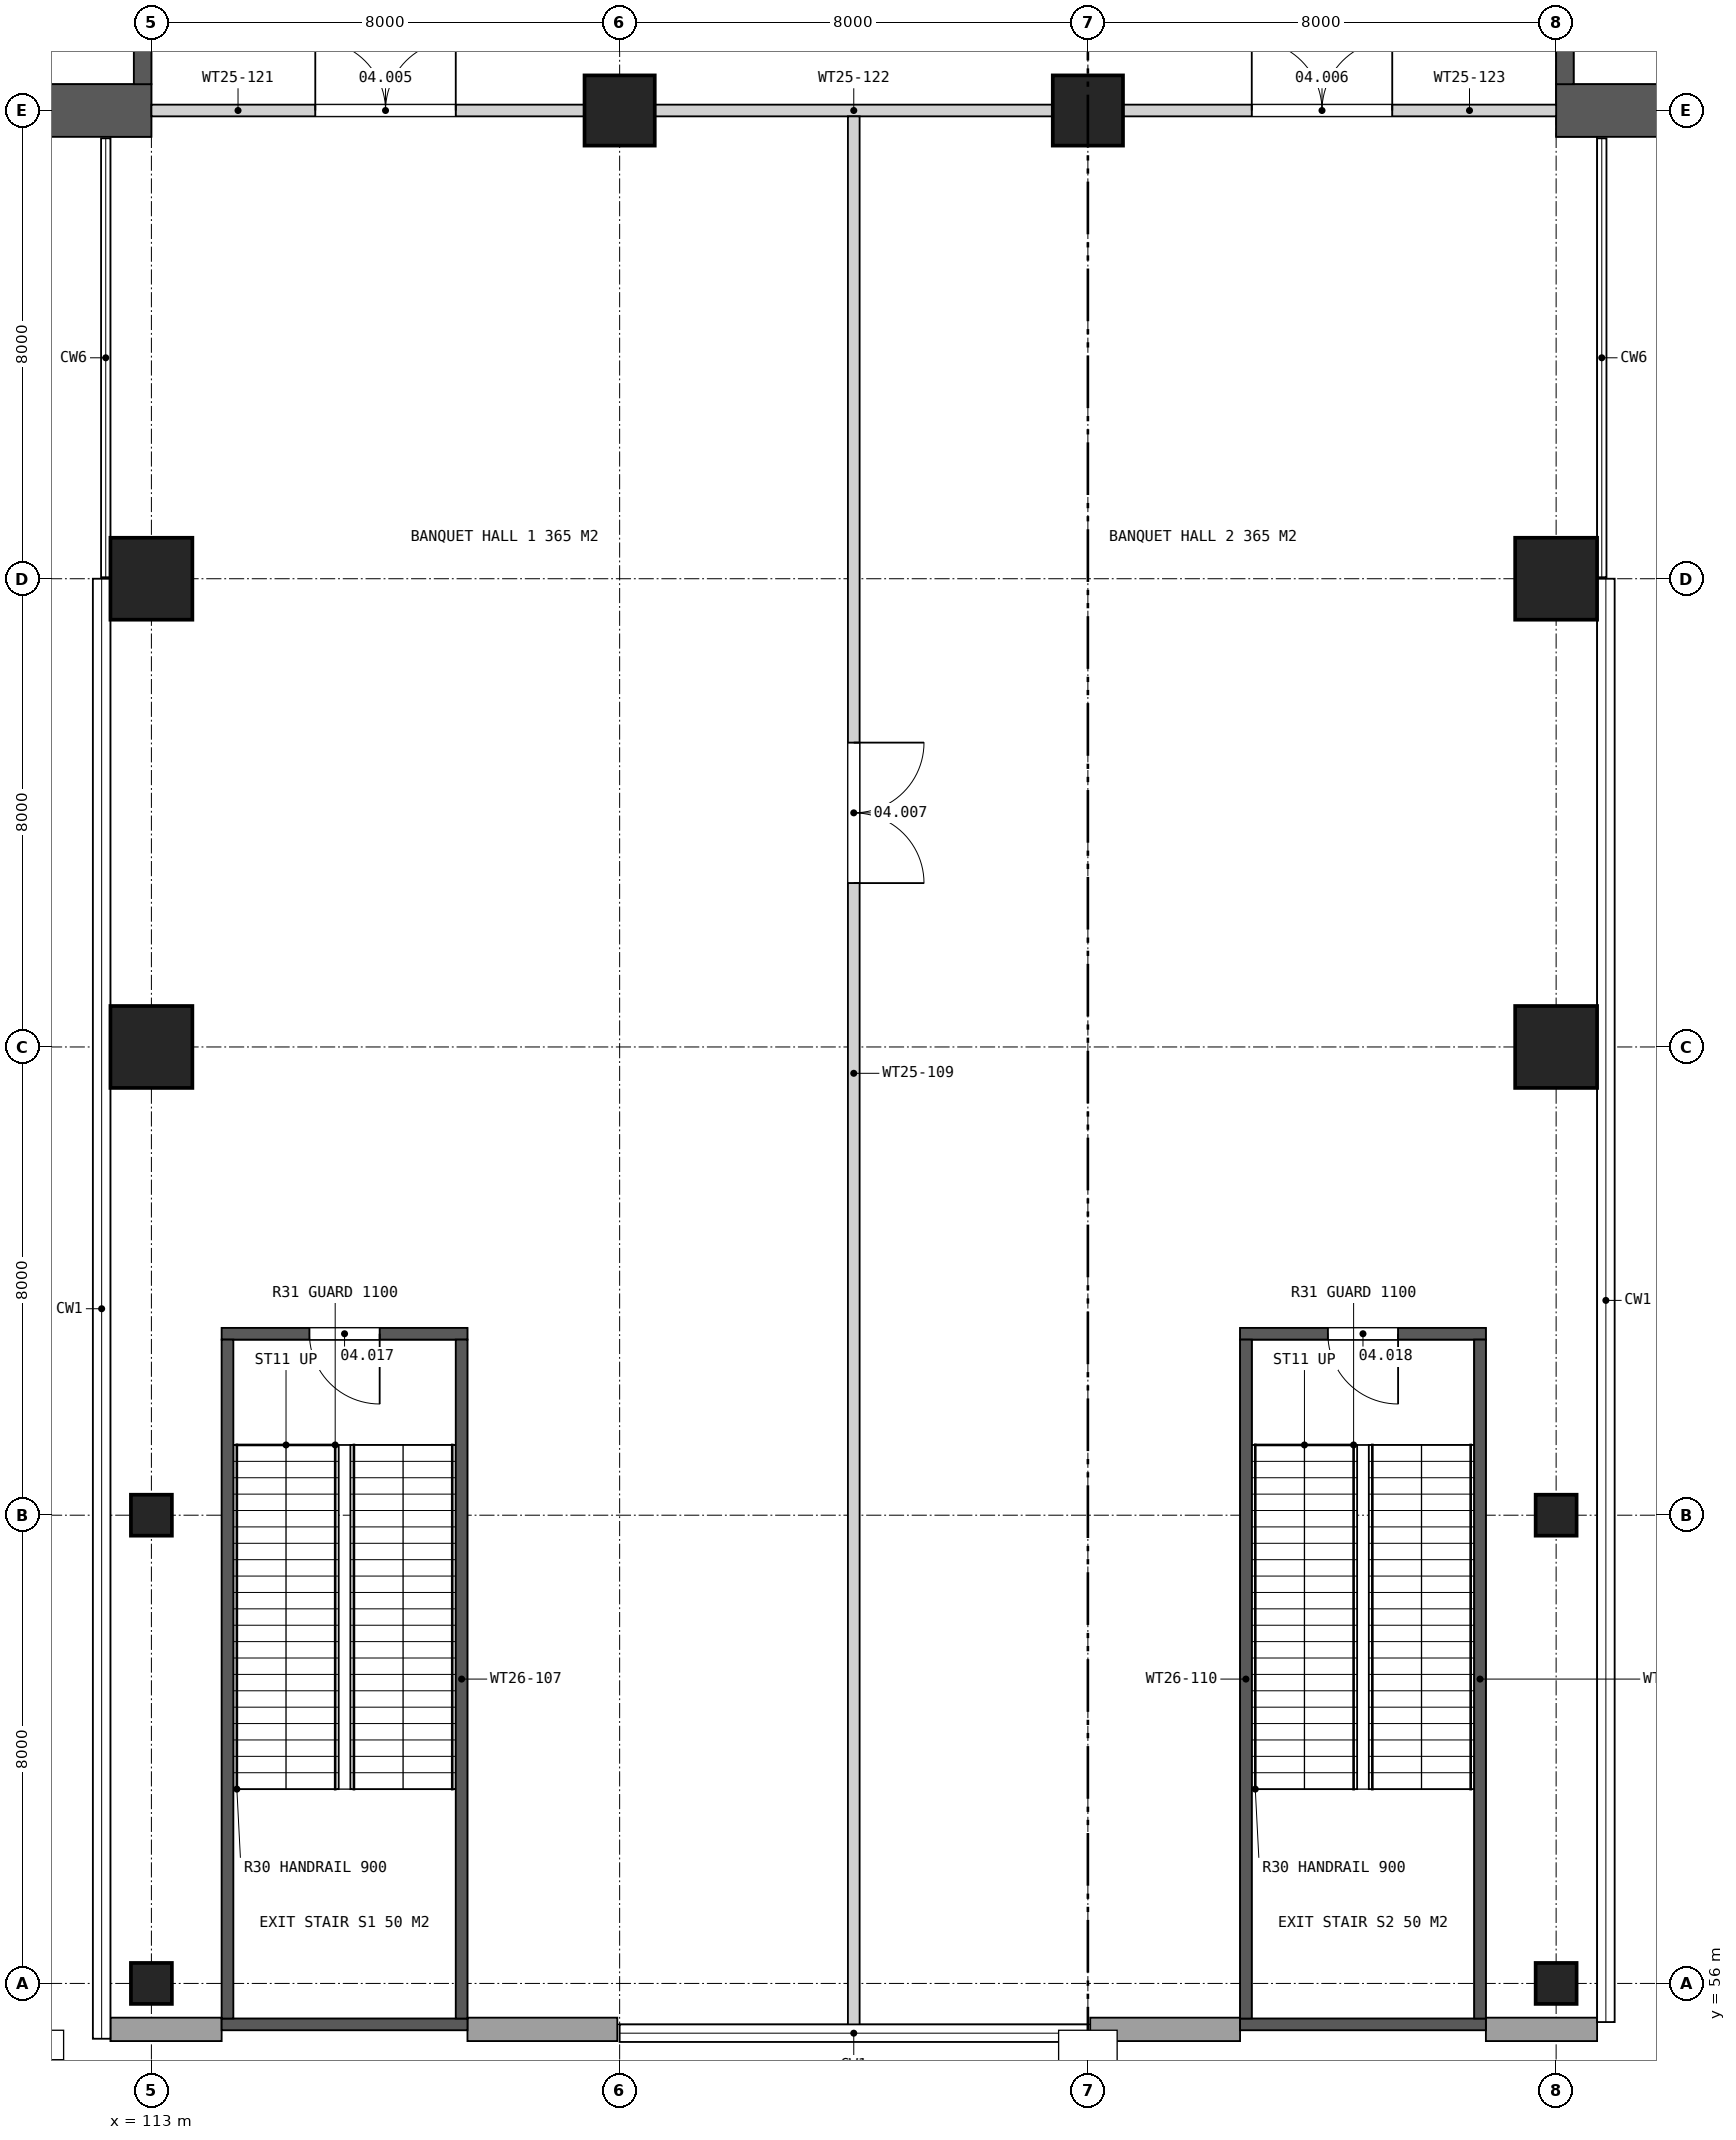
"""IFC4 building model, lengths in metres.
Left out: names, types, materials, properties, quantities, classifications, styles, units other than length and angle.
Written with IfcOpenShell. Run it as: python <this file> out.ifc"""

import sys

from ifc_helpers import new_model, si_unit, direction, frame, frame_2d, origin, origin_2d, place, context, subcontext, project, spatial, rectangle, extrude, element, fill, save


model = new_model("IFC4")
c1 = context("Model", 3, precision=1e-05, world=origin(), true_north=direction((0.0, 1.0)))
c2 = subcontext(c1, "Body", "Model", "MODEL_VIEW")
j1 = project(units=[si_unit("LENGTHUNIT", "METRE"), si_unit("PLANEANGLEUNIT", "RADIAN")], contexts=[c1])
p1 = place(None, origin())
s1 = spatial("IfcSite", under=j1, at=p1, CompositionType="ELEMENT")
p2 = place(p1, origin())
s2 = spatial("IfcBuilding", under=s1, at=p2, CompositionType="ELEMENT")
p3 = place(p2, frame((0.0, 0.0, 34.0)))
s3 = spatial("IfcBuildingStorey", under=s2, at=p3, CompositionType="ELEMENT", Elevation=34.0)
for number, where, z_axis, x_axis in (
    (1, (113.0, 56.0, 0.0), (0.0, 0.0, 1.0), (1.0, 0.0, 0.0)),
    (2, (113.0, 64.0, 0.0), (0.0, 0.0, 1.0), (1.0, 0.0, 0.0)),
):
    element("IfcColumn", number, at=place(p3, frame(where, z_axis=z_axis, x_axis=x_axis)), inside=s3, PredefinedType="COLUMN", context=c2, shape_type="SweptSolid", body=[
        extrude(rectangle(XDim=0.7, YDim=0.7, at=origin_2d()), origin(), (0.0, 0.0, 1.0), 7.5),
    ])
for number, where, z_axis, x_axis in (
    (3, (113.0, 72.0, 0.0), (0.0, 0.0, 1.0), (1.0, 0.0, 0.0)),
    (4, (113.0, 80.0, 0.0), (0.0, 0.0, 1.0), (1.0, 0.0, 0.0)),
):
    element("IfcColumn", number, at=place(p3, frame(where, z_axis=z_axis, x_axis=x_axis)), inside=s3, PredefinedType="COLUMN", context=c2, shape_type="SweptSolid", body=[
        extrude(rectangle(XDim=1.4, YDim=1.4, at=origin_2d()), origin(), (0.0, 0.0, 1.0), 7.5),
    ])
for number, where, z_axis, x_axis in (
    (5, (121.0, 88.0, 0.0), (0.0, 0.0, 1.0), (1.0, 0.0, 0.0)),
    (6, (129.0, 88.0, 0.0), (0.0, 0.0, 1.0), (1.0, 0.0, 0.0)),
):
    element("IfcColumn", number, at=place(p3, frame(where, z_axis=z_axis, x_axis=x_axis)), inside=s3, PredefinedType="COLUMN", context=c2, shape_type="SweptSolid", body=[
        extrude(rectangle(XDim=1.2, YDim=1.2, at=origin_2d()), origin(), (0.0, 0.0, 1.0), 7.5),
    ])
for number, where, z_axis, x_axis in (
    (7, (137.0, 56.0, 0.0), (0.0, 0.0, 1.0), (1.0, 0.0, 0.0)),
    (8, (137.0, 64.0, 0.0), (0.0, 0.0, 1.0), (1.0, 0.0, 0.0)),
):
    element("IfcColumn", number, at=place(p3, frame(where, z_axis=z_axis, x_axis=x_axis)), inside=s3, PredefinedType="COLUMN", context=c2, shape_type="SweptSolid", body=[
        extrude(rectangle(XDim=0.7, YDim=0.7, at=origin_2d()), origin(), (0.0, 0.0, 1.0), 7.5),
    ])
for number, where, z_axis, x_axis in (
    (9, (137.0, 72.0, 0.0), (0.0, 0.0, 1.0), (1.0, 0.0, 0.0)),
    (10, (137.0, 80.0, 0.0), (0.0, 0.0, 1.0), (1.0, 0.0, 0.0)),
):
    element("IfcColumn", number, at=place(p3, frame(where, z_axis=z_axis, x_axis=x_axis)), inside=s3, PredefinedType="COLUMN", context=c2, shape_type="SweptSolid", body=[
        extrude(rectangle(XDim=1.4, YDim=1.4, at=origin_2d()), origin(), (0.0, 0.0, 1.0), 7.5),
    ])
p4 = place(p3, frame((137.0, 88.0, 0.0), z_axis=(0.0, 0.0, 1.0), x_axis=(1.0, 0.0, 0.0)))
e11 = element("IfcWall", 11, at=p4, inside=s3, PredefinedType="SHEAR", context=c2, shape_type="SweptSolid", body=[
    extrude(rectangle(XDim=7.1, YDim=0.9, at=frame_2d((3.55, 0.0))), origin(), (0.0, 0.0, 1.0), 7.5),
])
p5 = place(p3, frame((137.15, 88.45, 0.0), z_axis=(0.0, 0.0, 1.0), x_axis=(0.0, 1.0, 0.0)))
e12 = element("IfcWall", 12, at=p5, inside=s3, PredefinedType="SHEAR", context=c2, shape_type="SweptSolid", body=[
    extrude(rectangle(XDim=5.85, YDim=0.3, at=frame_2d((2.925, 0.0))), origin(), (0.0, 0.0, 1.0), 7.5),
])
p6 = place(p3, frame((113.0, 88.0, 0.0), z_axis=(0.0, 0.0, 1.0), x_axis=(-1.0, 0.0, 0.0)))
e13 = element("IfcWall", 13, at=p6, inside=s3, PredefinedType="SHEAR", context=c2, shape_type="SweptSolid", body=[
    extrude(rectangle(XDim=7.1, YDim=0.9, at=frame_2d((3.55, 0.0))), origin(), (0.0, 0.0, 1.0), 7.5),
])
p7 = place(p3, frame((112.85, 94.3, 0.0), z_axis=(0.0, 0.0, 1.0), x_axis=(0.0, -1.0, 0.0)))
e14 = element("IfcWall", 14, at=p7, inside=s3, PredefinedType="SHEAR", context=c2, shape_type="SweptSolid", body=[
    extrude(rectangle(XDim=5.85, YDim=0.3, at=frame_2d((2.925, 0.0))), origin(), (0.0, 0.0, 1.0), 7.5),
])
p8 = place(p3, frame((112.3, 55.215, 0.0), z_axis=(0.0, 0.0, 1.0), x_axis=(1.0, 0.0, 0.0)))
e15 = element("IfcWall", 15, at=p8, inside=s3, PredefinedType="SOLIDWALL", context=c2, shape_type="SweptSolid", body=[
    extrude(rectangle(XDim=1.9, YDim=0.4, at=frame_2d((0.95, 0.0))), origin(), (0.0, 0.0, 1.0), 6.6),
])
for number, where, z_axis, x_axis in (
    (16, (118.4, 55.215, 0.0), (0.0, 0.0, 1.0), (1.0, 0.0, 0.0)),
    (17, (129.04, 55.215, 0.0), (0.0, 0.0, 1.0), (1.0, 0.0, 0.0)),
):
    element("IfcWall", number, at=place(p3, frame(where, z_axis=z_axis, x_axis=x_axis)), inside=s3, PredefinedType="SOLIDWALL", context=c2, shape_type="SweptSolid", body=[
        extrude(rectangle(XDim=2.56, YDim=0.4, at=frame_2d((1.28, 0.0))), origin(), (0.0, 0.0, 1.0), 6.2),
    ])
p9 = place(p3, frame((135.8, 55.215, 0.0), z_axis=(0.0, 0.0, 1.0), x_axis=(1.0, 0.0, 0.0)))
e18 = element("IfcWall", 18, at=p9, inside=s3, PredefinedType="SOLIDWALL", context=c2, shape_type="SweptSolid", body=[
    extrude(rectangle(XDim=1.9, YDim=0.4, at=frame_2d((0.95, 0.0))), origin(), (0.0, 0.0, 1.0), 6.6),
])
for number, where, z_axis, x_axis in (
    (19, (114.2, 55.3, 0.0), (0.0, 0.0, 1.0), (1.0, 0.0, 0.0)),
    (20, (131.6, 55.3, 0.0), (0.0, 0.0, 1.0), (1.0, 0.0, 0.0)),
):
    element("IfcWall", number, at=place(p3, frame(where, z_axis=z_axis, x_axis=x_axis)), inside=s3, PredefinedType="SOLIDWALL", context=c2, shape_type="SweptSolid", body=[
        extrude(rectangle(XDim=4.2, YDim=0.2, at=frame_2d((2.1, 0.0))), origin(), (0.0, 0.0, 1.0), 7.5),
    ])
p10 = place(p3, frame((114.2, 67.1, 0.0), z_axis=(0.0, 0.0, 1.0), x_axis=(1.0, 0.0, 0.0)))
e21 = element("IfcWall", 21, at=p10, inside=s3, PredefinedType="SOLIDWALL", context=c2, shape_type="SweptSolid", body=[
    extrude(rectangle(XDim=4.2, YDim=0.2, at=frame_2d((2.1, 0.0))), origin(), (0.0, 0.0, 1.0), 7.5),
])
p11 = place(p10, frame((1.5, 0.0, 0.0)))
e22 = element("IfcOpeningElement", 22, at=p11, cuts=e21, PredefinedType="OPENING", context=c2, shape_type="SweptSolid", body=[
    extrude(rectangle(XDim=1.2, YDim=2.2, at=frame_2d((0.6, 1.1))), frame((0.0, 0.11, 0.0), z_axis=(0.0, -1.0, 0.0), x_axis=(1.0, 0.0, 0.0)), (0.0, 0.0, 1.0), 0.22),
])
p12 = place(p3, frame((131.6, 67.1, 0.0), z_axis=(0.0, 0.0, 1.0), x_axis=(1.0, 0.0, 0.0)))
e23 = element("IfcWall", 23, at=p12, inside=s3, PredefinedType="SOLIDWALL", context=c2, shape_type="SweptSolid", body=[
    extrude(rectangle(XDim=4.2, YDim=0.2, at=frame_2d((2.1, 0.0))), origin(), (0.0, 0.0, 1.0), 7.5),
])
p13 = place(p12, frame((1.5, 0.0, 0.0)))
e24 = element("IfcOpeningElement", 24, at=p13, cuts=e23, PredefinedType="OPENING", context=c2, shape_type="SweptSolid", body=[
    extrude(rectangle(XDim=1.2, YDim=2.2, at=frame_2d((0.6, 1.1))), frame((0.0, 0.11, 0.0), z_axis=(0.0, -1.0, 0.0), x_axis=(1.0, 0.0, 0.0)), (0.0, 0.0, 1.0), 0.22),
])
p14 = place(p3, frame((113.0, 88.0, 0.0), z_axis=(0.0, 0.0, 1.0), x_axis=(1.0, 0.0, 0.0)))
e25 = element("IfcWall", 25, at=p14, inside=s3, PredefinedType="PARTITIONING", context=c2, shape_type="SweptSolid", body=[
    extrude(rectangle(XDim=7.4, YDim=0.2, at=frame_2d((3.7, 0.0))), origin(), (0.0, 0.0, 1.0), 6.551),
])
p15 = place(p14, frame((2.8, 0.0, 0.0)))
e26 = element("IfcOpeningElement", 26, at=p15, cuts=e25, PredefinedType="OPENING", context=c2, shape_type="SweptSolid", body=[
    extrude(rectangle(XDim=2.4, YDim=2.4, at=frame_2d((1.2, 1.2))), frame((0.0, 0.11, 0.0), z_axis=(0.0, -1.0, 0.0), x_axis=(1.0, 0.0, 0.0)), (0.0, 0.0, 1.0), 0.22),
])
p16 = place(p3, frame((121.6, 88.0, 0.0), z_axis=(0.0, 0.0, 1.0), x_axis=(1.0, 0.0, 0.0)))
e27 = element("IfcWall", 27, at=p16, inside=s3, PredefinedType="PARTITIONING", context=c2, shape_type="SweptSolid", body=[
    extrude(rectangle(XDim=6.8, YDim=0.2, at=frame_2d((3.4, 0.0))), origin(), (0.0, 0.0, 1.0), 6.555),
])
p17 = place(p3, frame((129.6, 88.0, 0.0), z_axis=(0.0, 0.0, 1.0), x_axis=(1.0, 0.0, 0.0)))
e28 = element("IfcWall", 28, at=p17, inside=s3, PredefinedType="PARTITIONING", context=c2, shape_type="SweptSolid", body=[
    extrude(rectangle(XDim=7.4, YDim=0.2, at=frame_2d((3.7, 0.0))), origin(), (0.0, 0.0, 1.0), 6.551),
])
p18 = place(p17, frame((2.2, 0.0, 0.0)))
e29 = element("IfcOpeningElement", 29, at=p18, cuts=e28, PredefinedType="OPENING", context=c2, shape_type="SweptSolid", body=[
    extrude(rectangle(XDim=2.4, YDim=2.4, at=frame_2d((1.2, 1.2))), frame((0.0, 0.11, 0.0), z_axis=(0.0, -1.0, 0.0), x_axis=(1.0, 0.0, 0.0)), (0.0, 0.0, 1.0), 0.22),
])
for number, where, z_axis, x_axis in (
    (30, (114.3, 55.4, 0.0), (0.0, 0.0, 1.0), (0.0, 1.0, 0.0)),
    (31, (118.3, 55.4, 0.0), (0.0, 0.0, 1.0), (0.0, 1.0, 0.0)),
):
    element("IfcWall", number, at=place(p3, frame(where, z_axis=z_axis, x_axis=x_axis)), inside=s3, PredefinedType="SOLIDWALL", context=c2, shape_type="SweptSolid", body=[
        extrude(rectangle(XDim=11.6, YDim=0.2, at=frame_2d((5.8, 0.0))), origin(), (0.0, 0.0, 1.0), 7.5),
    ])
p19 = place(p3, frame((125.0, 55.2, 0.0), z_axis=(0.0, 0.0, 1.0), x_axis=(0.0, 1.0, 0.0)))
e32 = element("IfcWall", 32, at=p19, inside=s3, PredefinedType="PARTITIONING", context=c2, shape_type="SweptSolid", body=[
    extrude(rectangle(XDim=32.7, YDim=0.2, at=frame_2d((16.35, 0.0))), origin(), (0.0, 0.0, 1.0), 5.6),
])
p20 = place(p19, frame((19.6, 0.0, 0.0)))
e33 = element("IfcOpeningElement", 33, at=p20, cuts=e32, PredefinedType="OPENING", context=c2, shape_type="SweptSolid", body=[
    extrude(rectangle(XDim=2.4, YDim=2.4, at=frame_2d((1.2, 1.2))), frame((0.0, 0.11, 0.0), z_axis=(0.0, -1.0, 0.0), x_axis=(1.0, 0.0, 0.0)), (0.0, 0.0, 1.0), 0.22),
])
for number, where, z_axis, x_axis in (
    (34, (131.7, 55.4, 0.0), (0.0, 0.0, 1.0), (0.0, 1.0, 0.0)),
    (35, (135.7, 55.4, 0.0), (0.0, 0.0, 1.0), (0.0, 1.0, 0.0)),
):
    element("IfcWall", number, at=place(p3, frame(where, z_axis=z_axis, x_axis=x_axis)), inside=s3, PredefinedType="SOLIDWALL", context=c2, shape_type="SweptSolid", body=[
        extrude(rectangle(XDim=11.6, YDim=0.2, at=frame_2d((5.8, 0.0))), origin(), (0.0, 0.0, 1.0), 7.5),
    ])
p21 = place(p15, origin())
e36 = element("IfcDoor", 36, at=p21, inside=s3, OperationType="DOUBLE_DOOR_SINGLE_SWING", PredefinedType="DOOR", context=c2, shape_type="SweptSolid", body=[
    extrude(rectangle(XDim=2.4, YDim=2.4, at=frame_2d((1.2, 1.2))), frame((0.0, 0.025, 0.0), z_axis=(0.0, -1.0, 0.0), x_axis=(1.0, 0.0, 0.0)), (0.0, 0.0, 1.0), 0.05),
])
fill(e26, e36)
p22 = place(p18, origin())
e37 = element("IfcDoor", 37, at=p22, inside=s3, OperationType="DOUBLE_DOOR_SINGLE_SWING", PredefinedType="DOOR", context=c2, shape_type="SweptSolid", body=[
    extrude(rectangle(XDim=2.4, YDim=2.4, at=frame_2d((1.2, 1.2))), frame((0.0, 0.025, 0.0), z_axis=(0.0, -1.0, 0.0), x_axis=(1.0, 0.0, 0.0)), (0.0, 0.0, 1.0), 0.05),
])
fill(e29, e37)
p23 = place(p20, frame((2.4, 0.0, 0.0), z_axis=(0.0, 0.0, 1.0), x_axis=(-1.0, 0.0, 0.0)))
e38 = element("IfcDoor", 38, at=p23, inside=s3, OperationType="DOUBLE_DOOR_SINGLE_SWING", PredefinedType="DOOR", context=c2, shape_type="SweptSolid", body=[
    extrude(rectangle(XDim=2.4, YDim=2.4, at=frame_2d((1.2, 1.2))), frame((0.0, 0.025, 0.0), z_axis=(0.0, -1.0, 0.0), x_axis=(1.0, 0.0, 0.0)), (0.0, 0.0, 1.0), 0.05),
])
fill(e33, e38)
p24 = place(p11, frame((1.2, 0.0, 0.0), z_axis=(0.0, 0.0, 1.0), x_axis=(-1.0, 0.0, 0.0)))
e39 = element("IfcDoor", 39, at=p24, inside=s3, OperationType="SINGLE_SWING_LEFT", PredefinedType="DOOR", context=c2, shape_type="SweptSolid", body=[
    extrude(rectangle(XDim=1.2, YDim=2.2, at=frame_2d((0.6, 1.1))), frame((0.0, 0.025, 0.0), z_axis=(0.0, -1.0, 0.0), x_axis=(1.0, 0.0, 0.0)), (0.0, 0.0, 1.0), 0.05),
])
fill(e22, e39)
p25 = place(p13, frame((1.2, 0.0, 0.0), z_axis=(0.0, 0.0, 1.0), x_axis=(-1.0, 0.0, 0.0)))
e40 = element("IfcDoor", 40, at=p25, inside=s3, OperationType="SINGLE_SWING_LEFT", PredefinedType="DOOR", context=c2, shape_type="SweptSolid", body=[
    extrude(rectangle(XDim=1.2, YDim=2.2, at=frame_2d((0.6, 1.1))), frame((0.0, 0.025, 0.0), z_axis=(0.0, -1.0, 0.0), x_axis=(1.0, 0.0, 0.0)), (0.0, 0.0, 1.0), 0.05),
])
fill(e24, e40)
save(model, sys.argv[1])
